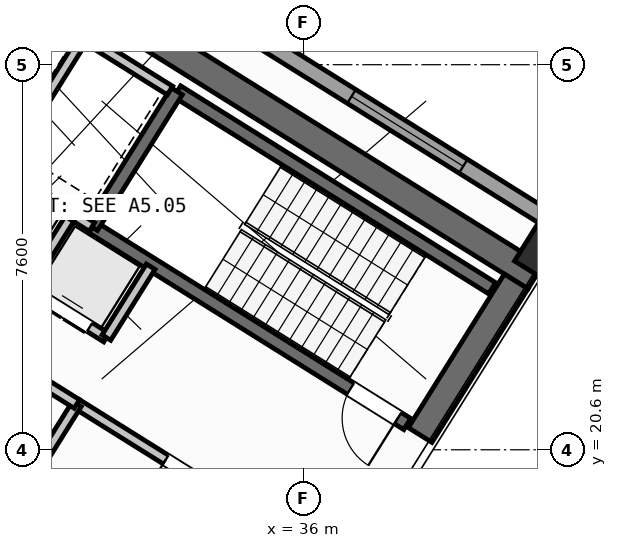
"""IFC4 building model, lengths in metres.
Left out: names, types, materials, properties, quantities, classifications, styles, units other than length and angle.
Written with IfcOpenShell. Run it as: python <this file> out.ifc"""

import sys

from ifc_helpers import new_model, si_unit, direction, frame, frame_2d, origin, origin_2d, place, context, subcontext, project, spatial, rectangle, hollow_rectangle, extrude, source, transform, mapped, element, fill, save


model = new_model("IFC4")
c1 = context("Model", 3, precision=1e-05, world=origin(), true_north=direction((0.0, 1.0)))
c2 = subcontext(c1, "Body", "Model", "MODEL_VIEW")
j1 = project(units=[si_unit("LENGTHUNIT", "METRE"), si_unit("PLANEANGLEUNIT", "RADIAN")], contexts=[c1])
p1 = place(None, origin())
s1 = spatial("IfcSite", under=j1, at=p1, CompositionType="ELEMENT")
p2 = place(p1, origin())
s2 = spatial("IfcBuilding", under=s1, at=p2, CompositionType="ELEMENT")
p3 = place(p2, frame((0.0, 0.0, 136.2)))
s3 = spatial("IfcBuildingStorey", under=s2, at=p3, CompositionType="ELEMENT", Elevation=136.2)
p4 = place(p3, frame((40.573, 24.01, 0.0), z_axis=(0.0, 0.0, 1.0), x_axis=(-0.848047359947, 0.529920442413, 0.0)))
e1 = element("IfcWall", 1, at=p4, inside=s3, PredefinedType="SHEAR", context=c2, shape_type="SweptSolid", body=[
    extrude(rectangle(XDim=13.14, YDim=0.55, at=frame_2d((6.57, 0.0))), origin(), (0.0, 0.0, 1.0), 4.25),
])
p5 = place(p3, frame((40.194, 23.922, 0.0), z_axis=(0.0, 0.0, 1.0), x_axis=(-0.529888438328, -0.848067357541, 0.0)))
e2 = element("IfcWall", 2, at=p5, inside=s3, PredefinedType="SHEAR", context=c2, shape_type="SweptSolid", body=[
    extrude(rectangle(XDim=3.575, YDim=0.55, at=frame_2d((1.788, 0.0))), origin(), (0.0, 0.0, 1.0), 4.25),
])
m1 = source(origin(), c2, "Body", "SweptSolid", [
    extrude(hollow_rectangle(XDim=0.9, YDim=0.9, WallThickness=0.036, at=origin_2d()), origin(), (0.0, 0.0, 1.0), 4.5),
])
p6 = place(p3, frame((40.783, 24.469, 0.0), z_axis=(0.0, 0.0, 1.0), x_axis=(-0.848048096156, 0.529919264233, 0.0)))
e3 = element("IfcColumn", 3, at=p6, inside=s3, PredefinedType="COLUMN", context=c2, shape_type="MappedRepresentation", body=[
    mapped(m1, transform((0.0, 0.0, 0.0), scale=1.0)),
])
p7 = place(p3, frame((14.138, 41.825, 0.0), z_axis=(0.0, 0.0, 1.0), x_axis=(0.848046498049, -0.529921821731, 0.0)))
e4 = element("IfcWall", 4, at=p7, inside=s3, PredefinedType="STANDARD", context=c2, shape_type="SweptSolid", body=[
    extrude(rectangle(XDim=31.588, YDim=0.32, at=frame_2d((15.794, 0.0))), origin(), (0.0, 0.0, 1.0), 4.25),
])
p8 = place(p7, frame((9.857, 0.0, 0.0)))
e5 = element("IfcOpeningElement", 5, at=p8, cuts=e4, PredefinedType="OPENING", context=c2, shape_type="SweptSolid", body=[
    extrude(rectangle(XDim=1.05, YDim=2.15, at=frame_2d((0.525, 1.075))), frame((0.0, 0.17, 0.0), z_axis=(0.0, -1.0, 0.0), x_axis=(1.0, 0.0, 0.0)), (0.0, 0.0, 1.0), 0.34),
])
p9 = place(p7, frame((0.862, 0.0, 0.85)))
e6 = element("IfcOpeningElement", 6, at=p9, cuts=e4, PredefinedType="OPENING", context=c2, shape_type="SweptSolid", body=[
    extrude(rectangle(XDim=1.6, YDim=1.8, at=frame_2d((0.8, 0.9))), frame((0.0, 0.17, 0.0), z_axis=(0.0, -1.0, 0.0), x_axis=(1.0, 0.0, 0.0)), (0.0, 0.0, 1.0), 0.34),
])
p10 = place(p7, frame((7.648, 0.0, 0.85)))
e7 = element("IfcOpeningElement", 7, at=p10, cuts=e4, PredefinedType="OPENING", context=c2, shape_type="SweptSolid", body=[
    extrude(rectangle(XDim=1.6, YDim=1.8, at=frame_2d((0.8, 0.9))), frame((0.0, 0.17, 0.0), z_axis=(0.0, -1.0, 0.0), x_axis=(1.0, 0.0, 0.0)), (0.0, 0.0, 1.0), 0.34),
])
p11 = place(p7, frame((13.824, 0.0, 0.85)))
e8 = element("IfcOpeningElement", 8, at=p11, cuts=e4, PredefinedType="OPENING", context=c2, shape_type="SweptSolid", body=[
    extrude(rectangle(XDim=1.6, YDim=1.8, at=frame_2d((0.8, 0.9))), frame((0.0, 0.17, 0.0), z_axis=(0.0, -1.0, 0.0), x_axis=(1.0, 0.0, 0.0)), (0.0, 0.0, 1.0), 0.34),
])
p12 = place(p7, frame((21.294, 0.0, 0.7)))
e9 = element("IfcOpeningElement", 9, at=p12, cuts=e4, PredefinedType="OPENING", context=c2, shape_type="SweptSolid", body=[
    extrude(rectangle(XDim=2.6, YDim=2.0, at=frame_2d((1.3, 1.0))), frame((0.0, 0.17, 0.0), z_axis=(0.0, -1.0, 0.0), x_axis=(1.0, 0.0, 0.0)), (0.0, 0.0, 1.0), 0.34),
])
p13 = place(p7, frame((26.894, 0.0, 0.7)))
e10 = element("IfcOpeningElement", 10, at=p13, cuts=e4, PredefinedType="OPENING", context=c2, shape_type="SweptSolid", body=[
    extrude(rectangle(XDim=2.6, YDim=2.0, at=frame_2d((1.3, 1.0))), frame((0.0, 0.17, 0.0), z_axis=(0.0, -1.0, 0.0), x_axis=(1.0, 0.0, 0.0)), (0.0, 0.0, 1.0), 0.34),
])
p14 = place(p3, frame((31.28, 18.261, 0.0), z_axis=(0.0, 0.0, 1.0), x_axis=(-0.848051618787, 0.529913626805, 0.0)))
e11 = element("IfcWall", 11, at=p14, inside=s3, PredefinedType="SHEAR", context=c2, shape_type="SweptSolid", body=[
    extrude(rectangle(XDim=7.46, YDim=0.26, at=frame_2d((3.73, 0.0))), origin(), (0.0, 0.0, 1.0), 4.25),
])
p15 = place(p14, frame((0.36, 0.0, 0.0)))
e12 = element("IfcOpeningElement", 12, at=p15, cuts=e11, PredefinedType="OPENING", context=c2, shape_type="SweptSolid", body=[
    extrude(rectangle(XDim=0.86, YDim=2.05, at=frame_2d((0.43, 1.025))), frame((0.0, 0.14, 0.0), z_axis=(0.0, -1.0, 0.0), x_axis=(1.0, 0.0, 0.0)), (0.0, 0.0, 1.0), 0.28),
])
p16 = place(p3, frame((39.721, 23.788, 0.0), z_axis=(0.0, 0.0, 1.0), x_axis=(-0.848054434086, 0.529909121291, 0.0)))
e13 = element("IfcWall", 13, at=p16, inside=s3, PredefinedType="SHEAR", context=c2, shape_type="SweptSolid", body=[
    extrude(rectangle(XDim=7.33, YDim=0.26, at=frame_2d((3.665, 0.0))), origin(), (0.0, 0.0, 1.0), 4.25),
])
p17 = place(p3, frame((38.046, 21.108, 0.0), z_axis=(0.0, 0.0, 1.0), x_axis=(-0.848054434086, 0.529909121291, 0.0)))
e14 = element("IfcWall", 14, at=p17, inside=s3, PredefinedType="SHEAR", context=c2, shape_type="SweptSolid", body=[
    extrude(rectangle(XDim=7.33, YDim=0.26, at=frame_2d((3.665, 0.0))), origin(), (0.0, 0.0, 1.0), 4.25),
])
p18 = place(p17, frame((0.22, 0.0, 0.0)))
e15 = element("IfcOpeningElement", 15, at=p18, cuts=e14, PredefinedType="OPENING", context=c2, shape_type="SweptSolid", body=[
    extrude(rectangle(XDim=1.1, YDim=2.1, at=frame_2d((0.55, 1.05))), frame((0.0, 0.14, 0.0), z_axis=(0.0, -1.0, 0.0), x_axis=(1.0, 0.0, 0.0)), (0.0, 0.0, 1.0), 0.28),
])
p19 = place(p3, frame((33.496, 27.677, 0.0), z_axis=(0.0, 0.0, 1.0), x_axis=(-0.529908658664, -0.84805472316, 0.0)))
e16 = element("IfcWall", 16, at=p19, inside=s3, PredefinedType="SHEAR", context=c2, shape_type="SweptSolid", body=[
    extrude(rectangle(XDim=3.16, YDim=0.26, at=frame_2d((1.58, 0.0))), origin(), (0.0, 0.0, 1.0), 4.25),
])
p20 = place(p3, frame((36.417, 18.447, 0.0), z_axis=(0.0, 0.0, 1.0), x_axis=(-0.848064879198, 0.529892404805, 0.0)))
e17 = element("IfcWall", 17, at=p20, inside=s3, PredefinedType="STANDARD", context=c2, shape_type="SweptSolid", body=[
    extrude(rectangle(XDim=5.768, YDim=0.2, at=frame_2d((2.884, 0.0))), origin(), (0.0, 0.0, 1.0), 4.24),
])
p21 = place(p20, frame((2.548, 0.0, 0.0)))
e18 = element("IfcOpeningElement", 18, at=p21, cuts=e17, PredefinedType="OPENING", context=c2, shape_type="SweptSolid", body=[
    extrude(rectangle(XDim=1.15, YDim=2.1, at=frame_2d((0.575, 1.05))), frame((0.0, 0.11, 0.0), z_axis=(0.0, -1.0, 0.0), x_axis=(1.0, 0.0, 0.0)), (0.0, 0.0, 1.0), 0.22),
])
p22 = place(p3, frame((31.822, 24.998, 0.0), z_axis=(0.0, 0.0, 1.0), x_axis=(-0.848036912365, 0.52993716162, 0.0)))
e19 = element("IfcWall", 19, at=p22, inside=s3, PredefinedType="STANDARD", context=c2, shape_type="SweptSolid", body=[
    extrude(rectangle(XDim=4.618, YDim=0.2, at=frame_2d((2.309, 0.0))), origin(), (0.0, 0.0, 1.0), 4.24),
])
p23 = place(p3, frame((32.108, 22.814, 0.0), z_axis=(0.0, 0.0, 1.0), x_axis=(-0.848042229521, 0.529928652696, 0.0)))
e20 = element("IfcWall", 20, at=p23, inside=s3, PredefinedType="STANDARD", context=c2, shape_type="SweptSolid", body=[
    extrude(rectangle(XDim=5.62, YDim=0.2, at=frame_2d((2.81, 0.0))), origin(), (0.0, 0.0, 1.0), 4.24),
])
p24 = place(p23, frame((0.39, 0.0, 0.0)))
e21 = element("IfcOpeningElement", 21, at=p24, cuts=e20, PredefinedType="OPENING", context=c2, shape_type="SweptSolid", body=[
    extrude(rectangle(XDim=1.1, YDim=2.15, at=frame_2d((0.55, 1.075))), frame((0.0, 0.11, 0.0), z_axis=(0.0, -1.0, 0.0), x_axis=(1.0, 0.0, 0.0)), (0.0, 0.0, 1.0), 0.22),
])
p25 = place(p23, frame((2.25, 0.0, 0.0)))
e22 = element("IfcOpeningElement", 22, at=p25, cuts=e20, PredefinedType="OPENING", context=c2, shape_type="SweptSolid", body=[
    extrude(rectangle(XDim=1.1, YDim=2.15, at=frame_2d((0.55, 1.075))), frame((0.0, 0.11, 0.0), z_axis=(0.0, -1.0, 0.0), x_axis=(1.0, 0.0, 0.0)), (0.0, 0.0, 1.0), 0.22),
])
p26 = place(p23, frame((4.11, 0.0, 0.0)))
e23 = element("IfcOpeningElement", 23, at=p26, cuts=e20, PredefinedType="OPENING", context=c2, shape_type="SweptSolid", body=[
    extrude(rectangle(XDim=1.1, YDim=2.15, at=frame_2d((0.55, 1.075))), frame((0.0, 0.11, 0.0), z_axis=(0.0, -1.0, 0.0), x_axis=(1.0, 0.0, 0.0)), (0.0, 0.0, 1.0), 0.22),
])
p27 = place(p3, frame((32.982, 24.213, 0.0), z_axis=(0.0, 0.0, 1.0), x_axis=(-0.529839334948, -0.84809803628, 0.0)))
e24 = element("IfcWall", 24, at=p27, inside=s3, PredefinedType="STANDARD", context=c2, shape_type="SweptSolid", body=[
    extrude(rectangle(XDim=1.65, YDim=0.2, at=frame_2d((0.825, 0.0))), origin(), (0.0, 0.0, 1.0), 4.24),
])
p28 = place(p3, frame((31.645, 28.716, 0.0), z_axis=(0.0, 0.0, 1.0), x_axis=(-0.52986693015, -0.848080795876, 0.0)))
e25 = element("IfcWall", 25, at=p28, inside=s3, PredefinedType="STANDARD", context=c2, shape_type="SweptSolid", body=[
    extrude(rectangle(XDim=2.66, YDim=0.2, at=frame_2d((1.33, 0.0))), origin(), (0.0, 0.0, 1.0), 4.24),
])
p29 = place(p3, frame((33.363, 27.69, 0.0), z_axis=(0.0, 0.0, 1.0), x_axis=(-0.848047090064, 0.529920874315, 0.0)))
e26 = element("IfcWall", 26, at=p29, inside=s3, PredefinedType="STANDARD", context=c2, shape_type="SweptSolid", body=[
    extrude(rectangle(XDim=4.498, YDim=0.2, at=frame_2d((2.249, 0.0))), origin(), (0.0, 0.0, 1.0), 4.24),
])
p30 = place(p3, frame((31.379, 25.156, 0.0), z_axis=(0.0, 0.0, 1.0), x_axis=(-0.529998940003, -0.847998304005, 0.0)))
e27 = element("IfcWall", 27, at=p30, inside=s3, PredefinedType="STANDARD", context=c2, shape_type="SweptSolid", body=[
    extrude(rectangle(XDim=1.58, YDim=0.2, at=frame_2d((0.79, 0.0))), origin(), (0.0, 0.0, 1.0), 4.24),
])
p31 = place(p3, frame((31.525, 21.504, 0.0), z_axis=(0.0, 0.0, 1.0), x_axis=(-0.529907497854, -0.848055448493, 0.0)))
e28 = element("IfcWall", 28, at=p31, inside=s3, PredefinedType="STANDARD", context=c2, shape_type="SweptSolid", body=[
    extrude(rectangle(XDim=2.88, YDim=0.2, at=frame_2d((1.44, 0.0))), origin(), (0.0, 0.0, 1.0), 4.24),
])
p32 = place(p3, frame((31.525, 21.504, 0.0), z_axis=(0.0, 0.0, 1.0), x_axis=(-0.848040211232, 0.529931882541, 0.0)))
e29 = element("IfcWall", 29, at=p32, inside=s3, PredefinedType="STANDARD", context=c2, shape_type="SweptSolid", body=[
    extrude(rectangle(XDim=6.218, YDim=0.2, at=frame_2d((3.109, 0.0))), origin(), (0.0, 0.0, 1.0), 4.24),
])
p33 = place(p32, frame((4.4, 0.0, 0.0)))
e30 = element("IfcOpeningElement", 30, at=p33, cuts=e29, PredefinedType="OPENING", context=c2, shape_type="SweptSolid", body=[
    extrude(rectangle(XDim=0.86, YDim=2.05, at=frame_2d((0.43, 1.025))), frame((0.0, 0.11, 0.0), z_axis=(0.0, -1.0, 0.0), x_axis=(1.0, 0.0, 0.0)), (0.0, 0.0, 1.0), 0.22),
])
p34 = place(p32, frame((1.45, 0.0, 0.0)))
e31 = element("IfcOpeningElement", 31, at=p34, cuts=e29, PredefinedType="OPENING", context=c2, shape_type="SweptSolid", body=[
    extrude(rectangle(XDim=0.86, YDim=2.05, at=frame_2d((0.43, 1.025))), frame((0.0, 0.11, 0.0), z_axis=(0.0, -1.0, 0.0), x_axis=(1.0, 0.0, 0.0)), (0.0, 0.0, 1.0), 0.22),
])
m2 = source(origin(), c2, "Body", "SweptSolid", [
    extrude(rectangle(XDim=2.6, YDim=2.0, at=frame_2d((1.3, 1.0))), frame((0.0, 0.03, 0.0), z_axis=(0.0, -1.0, 0.0), x_axis=(1.0, 0.0, 0.0)), (0.0, 0.0, 1.0), 0.06),
])
p35 = place(p13, origin())
e32 = element("IfcWindow", 32, at=p35, inside=s3, PartitioningType="SINGLE_PANEL", PredefinedType="WINDOW", context=c2, shape_type="MappedRepresentation", body=[
    mapped(m2, transform((0.0, 0.0, 0.0), scale=1.0)),
])
fill(e10, e32)
m3 = source(origin(), c2, "Body", "SweptSolid", [
    extrude(rectangle(XDim=1.1, YDim=2.1, at=frame_2d((0.55, 1.05))), frame((0.0, 0.025, 0.0), z_axis=(0.0, -1.0, 0.0), x_axis=(1.0, 0.0, 0.0)), (0.0, 0.0, 1.0), 0.05),
])
p36 = place(p18, origin())
e33 = element("IfcDoor", 33, at=p36, inside=s3, OperationType="SINGLE_SWING_LEFT", PredefinedType="DOOR", context=c2, shape_type="MappedRepresentation", body=[
    mapped(m3, transform((0.0, 0.0, 0.0), scale=1.0)),
])
fill(e15, e33)
m4 = source(origin(), c2, "Body", "SweptSolid", [
    extrude(rectangle(XDim=1.15, YDim=2.1, at=frame_2d((0.575, 1.05))), frame((0.0, 0.025, 0.0), z_axis=(0.0, -1.0, 0.0), x_axis=(1.0, 0.0, 0.0)), (0.0, 0.0, 1.0), 0.05),
])
p37 = place(p21, origin())
e34 = element("IfcDoor", 34, at=p37, inside=s3, OperationType="SINGLE_SWING_RIGHT", PredefinedType="DOOR", context=c2, shape_type="MappedRepresentation", body=[
    mapped(m4, transform((0.0, 0.0, 0.0), scale=1.0)),
])
fill(e18, e34)
m5 = source(origin(), c2, "Body", "SweptSolid", [
    extrude(rectangle(XDim=1.1, YDim=2.15, at=frame_2d((0.55, 1.075))), frame((0.0, 0.025, 0.0), z_axis=(0.0, -1.0, 0.0), x_axis=(1.0, 0.0, 0.0)), (0.0, 0.0, 1.0), 0.05),
])
p38 = place(p24, origin())
e35 = element("IfcDoor", 35, at=p38, inside=s3, OperationType="DOUBLE_DOOR_SLIDING", PredefinedType="DOOR", context=c2, shape_type="MappedRepresentation", body=[
    mapped(m5, transform((0.0, 0.0, 0.0), scale=1.0)),
])
fill(e21, e35)
save(model, sys.argv[1])
